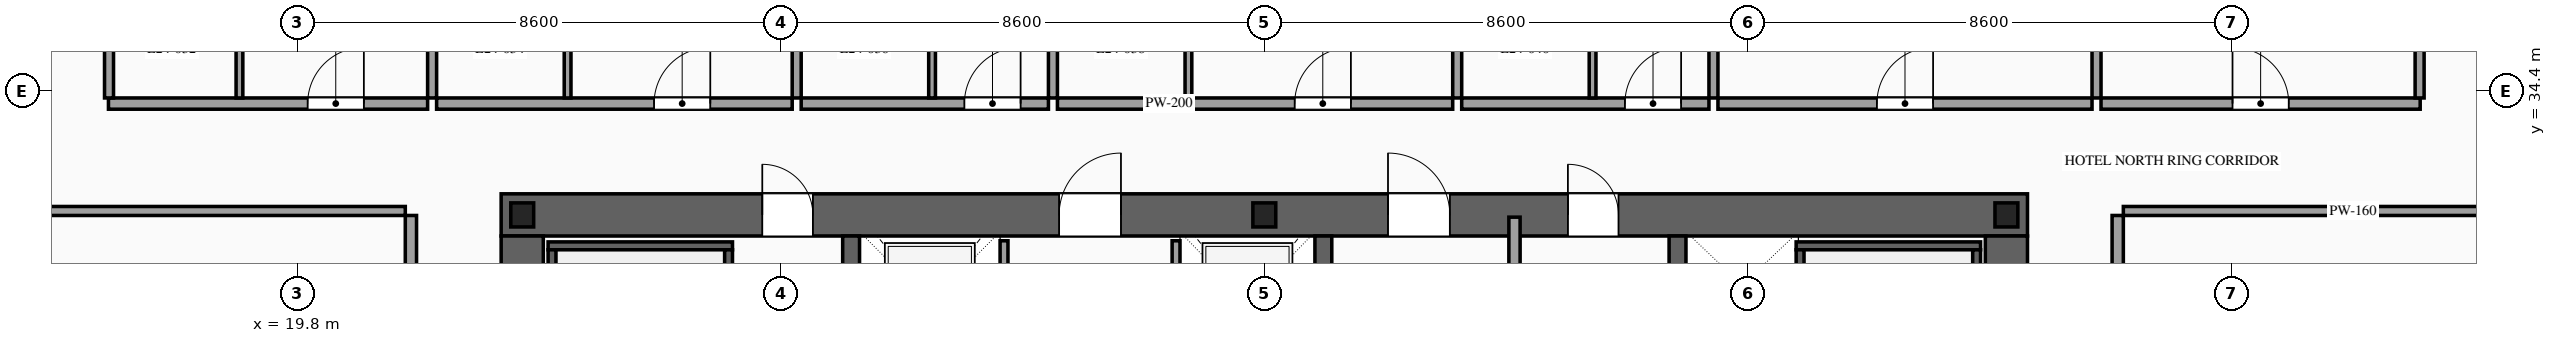
"""IFC4 building model, lengths in metres.
Left out: names, types, materials, properties, quantities, classifications, styles, units other than length and angle.
Written with IfcOpenShell. Run it as: python <this file> out.ifc"""

import sys

from ifc_helpers import new_model, si_unit, direction, frame, frame_2d, origin, origin_2d, place, context, subcontext, project, spatial, rectangle, i_section, extrude, source, transform, mapped, element, fill, save


model = new_model("IFC4")
c1 = context("Model", 3, precision=1e-05, world=origin(), true_north=direction((0.0, 1.0)))
c2 = subcontext(c1, "Body", "Model", "MODEL_VIEW")
j1 = project(units=[si_unit("LENGTHUNIT", "METRE"), si_unit("PLANEANGLEUNIT", "RADIAN")], contexts=[c1])
p1 = place(None, origin())
s1 = spatial("IfcSite", under=j1, at=p1, CompositionType="ELEMENT")
p2 = place(p1, origin())
s2 = spatial("IfcBuilding", under=s1, at=p2, CompositionType="ELEMENT")
p3 = place(p2, frame((0.0, 0.0, 93.8)))
s3 = spatial("IfcBuildingStorey", under=s2, at=p3, CompositionType="ELEMENT", Elevation=93.8)
p4 = place(p3, frame((23.425, 32.2, 0.0), z_axis=(0.0, 0.0, 1.0), x_axis=(1.0, 0.0, 0.0)))
e1 = element("IfcWall", 1, at=p4, inside=s3, PredefinedType="SHEAR", context=c2, shape_type="SweptSolid", body=[
    extrude(rectangle(XDim=27.15, YDim=0.75, at=frame_2d((13.575, 0.0))), origin(), (0.0, 0.0, 1.0), 3.6),
])
p5 = place(p4, frame((4.645, 0.0, 0.0)))
e2 = element("IfcOpeningElement", 2, at=p5, cuts=e1, PredefinedType="OPENING", context=c2, shape_type="SweptSolid", body=[
    extrude(rectangle(XDim=0.9, YDim=2.15, at=frame_2d((0.45, 1.075))), frame((0.0, 0.39, 0.0), z_axis=(0.0, -1.0, 0.0), x_axis=(1.0, 0.0, 0.0)), (0.0, 0.0, 1.0), 0.78),
])
p6 = place(p4, frame((9.925, 0.0, 0.0)))
e3 = element("IfcOpeningElement", 3, at=p6, cuts=e1, PredefinedType="OPENING", context=c2, shape_type="SweptSolid", body=[
    extrude(rectangle(XDim=1.1, YDim=2.2, at=frame_2d((0.55, 1.1))), frame((0.0, 0.39, 0.0), z_axis=(0.0, -1.0, 0.0), x_axis=(1.0, 0.0, 0.0)), (0.0, 0.0, 1.0), 0.78),
])
p7 = place(p4, frame((15.775, 0.0, 0.0)))
e4 = element("IfcOpeningElement", 4, at=p7, cuts=e1, PredefinedType="OPENING", context=c2, shape_type="SweptSolid", body=[
    extrude(rectangle(XDim=1.1, YDim=2.2, at=frame_2d((0.55, 1.1))), frame((0.0, 0.39, 0.0), z_axis=(0.0, -1.0, 0.0), x_axis=(1.0, 0.0, 0.0)), (0.0, 0.0, 1.0), 0.78),
])
p8 = place(p4, frame((18.975, 0.0, 0.0)))
e5 = element("IfcOpeningElement", 5, at=p8, cuts=e1, PredefinedType="OPENING", context=c2, shape_type="SweptSolid", body=[
    extrude(rectangle(XDim=0.9, YDim=2.15, at=frame_2d((0.45, 1.075))), frame((0.0, 0.39, 0.0), z_axis=(0.0, -1.0, 0.0), x_axis=(1.0, 0.0, 0.0)), (0.0, 0.0, 1.0), 0.78),
])
m1 = source(origin(), c2, "Body", "SweptSolid", [
    extrude(rectangle(XDim=12.05, YDim=0.75, at=frame_2d((6.025, 0.0))), origin(), (0.0, 0.0, 1.0), 3.6),
])
for number, where, z_axis, x_axis in (
    (6, (23.8, 19.775, 0.0), (0.0, 0.0, 1.0), (0.0, 1.0, 0.0)),
    (7, (50.2, 19.775, 0.0), (0.0, 0.0, 1.0), (0.0, 1.0, 0.0)),
):
    element("IfcWall", number, at=place(p3, frame(where, z_axis=z_axis, x_axis=x_axis)), inside=s3, PredefinedType="SHEAR", context=c2, shape_type="MappedRepresentation", body=[
        mapped(m1, transform((0.0, 0.0, 0.0), scale=1.0)),
    ])
m2 = source(origin(), c2, "Body", "SweptSolid", [
    extrude(rectangle(XDim=12.05, YDim=0.3, at=frame_2d((6.025, 0.0))), origin(), (0.0, 0.0, 1.0), 3.6),
])
for number, where, z_axis, x_axis in (
    (8, (29.65, 19.775, 0.0), (0.0, 0.0, 1.0), (0.0, 1.0, 0.0)),
    (9, (38.05, 19.775, 0.0), (0.0, 0.0, 1.0), (0.0, 1.0, 0.0)),
    (10, (44.35, 19.775, 0.0), (0.0, 0.0, 1.0), (0.0, 1.0, 0.0)),
):
    element("IfcWall", number, at=place(p3, frame(where, z_axis=z_axis, x_axis=x_axis)), inside=s3, PredefinedType="SOLIDWALL", context=c2, shape_type="MappedRepresentation", body=[
        mapped(m2, transform((0.0, 0.0, 0.0), scale=1.0)),
    ])
m3 = source(origin(), c2, "Body", "SweptSolid", [
    extrude(i_section(OverallWidth=0.407, OverallDepth=0.428, WebThickness=0.02, FlangeThickness=0.035, at=origin_2d()), origin(), (0.0, 0.0, 1.0), 3.6),
])
for number, where, z_axis, x_axis in (
    (11, (23.8, 32.2, 0.0), (0.0, 0.0, 1.0), (1.0, 0.0, 0.0)),
    (12, (37.0, 32.2, 0.0), (0.0, 0.0, 1.0), (1.0, 0.0, 0.0)),
    (13, (50.2, 32.2, 0.0), (0.0, 0.0, 1.0), (1.0, 0.0, 0.0)),
):
    element("IfcColumn", number, at=place(p3, frame(where, z_axis=z_axis, x_axis=x_axis)), inside=s3, PredefinedType="COLUMN", context=c2, shape_type="MappedRepresentation", body=[
        mapped(m3, transform((0.0, 0.0, 0.0), scale=1.0)),
    ])
p9 = place(p3, frame((32.37, 29.4, 0.0), z_axis=(0.0, 0.0, 1.0), x_axis=(0.0, 1.0, 0.0)))
e14 = element("IfcWall", 14, at=p9, inside=s3, PredefinedType="SOLIDWALL", context=c2, shape_type="SweptSolid", body=[
    extrude(rectangle(XDim=2.34, YDim=0.14, at=frame_2d((1.17, 0.0))), origin(), (0.0, 0.0, 1.0), 3.38),
])
p10 = place(p9, frame((0.62, 0.0, 0.0)))
e15 = element("IfcOpeningElement", 15, at=p10, cuts=e14, PredefinedType="OPENING", context=c2, shape_type="SweptSolid", body=[
    extrude(rectangle(XDim=1.1, YDim=2.2, at=frame_2d((0.55, 1.1))), frame((0.0, 0.085, 0.0), z_axis=(0.0, -1.0, 0.0), x_axis=(1.0, 0.0, 0.0)), (0.0, 0.0, 1.0), 0.17),
])
p11 = place(p3, frame((35.43, 29.4, 0.0), z_axis=(0.0, 0.0, 1.0), x_axis=(0.0, 1.0, 0.0)))
e16 = element("IfcWall", 16, at=p11, inside=s3, PredefinedType="SOLIDWALL", context=c2, shape_type="SweptSolid", body=[
    extrude(rectangle(XDim=2.34, YDim=0.14, at=frame_2d((1.17, 0.0))), origin(), (0.0, 0.0, 1.0), 3.38),
])
p12 = place(p11, frame((0.62, 0.0, 0.0)))
e17 = element("IfcOpeningElement", 17, at=p12, cuts=e16, PredefinedType="OPENING", context=c2, shape_type="SweptSolid", body=[
    extrude(rectangle(XDim=1.1, YDim=2.2, at=frame_2d((0.55, 1.1))), frame((0.0, 0.085, 0.0), z_axis=(0.0, -1.0, 0.0), x_axis=(1.0, 0.0, 0.0)), (0.0, 0.0, 1.0), 0.17),
])
m4 = source(origin(), c2, "Body", "SweptSolid", [
    extrude(rectangle(XDim=3.28, YDim=0.14, at=frame_2d((1.64, 0.0))), origin(), (0.0, 0.0, 1.0), 3.38),
])
p13 = place(p3, frame((24.26, 31.65, 0.0), z_axis=(0.0, 0.0, 1.0), x_axis=(1.0, 0.0, 0.0)))
e18 = element("IfcWall", 18, at=p13, inside=s3, PredefinedType="SOLIDWALL", context=c2, shape_type="MappedRepresentation", body=[
    mapped(m4, transform((0.0, 0.0, 0.0), scale=1.0)),
])
m5 = source(origin(), c2, "Body", "SweptSolid", [
    extrude(rectangle(XDim=8.94, YDim=0.14, at=frame_2d((4.47, 0.0))), origin(), (0.0, 0.0, 1.0), 3.38),
])
for number, where, z_axis, x_axis in (
    (19, (24.33, 22.64, 0.0), (0.0, 0.0, 1.0), (0.0, 1.0, 0.0)),
    (20, (27.47, 22.64, 0.0), (0.0, 0.0, 1.0), (0.0, 1.0, 0.0)),
):
    element("IfcWall", number, at=place(p3, frame(where, z_axis=z_axis, x_axis=x_axis)), inside=s3, PredefinedType="SOLIDWALL", context=c2, shape_type="MappedRepresentation", body=[
        mapped(m5, transform((0.0, 0.0, 0.0), scale=1.0)),
    ])
p14 = place(p3, frame((46.46, 31.65, 0.0), z_axis=(0.0, 0.0, 1.0), x_axis=(1.0, 0.0, 0.0)))
e21 = element("IfcWall", 21, at=p14, inside=s3, PredefinedType="SOLIDWALL", context=c2, shape_type="MappedRepresentation", body=[
    mapped(m4, transform((0.0, 0.0, 0.0), scale=1.0)),
])
for number, where, z_axis, x_axis in (
    (22, (46.53, 22.64, 0.0), (0.0, 0.0, 1.0), (0.0, 1.0, 0.0)),
    (23, (49.67, 22.64, 0.0), (0.0, 0.0, 1.0), (0.0, 1.0, 0.0)),
):
    element("IfcWall", number, at=place(p3, frame(where, z_axis=z_axis, x_axis=x_axis)), inside=s3, PredefinedType="SOLIDWALL", context=c2, shape_type="MappedRepresentation", body=[
        mapped(m5, transform((0.0, 0.0, 0.0), scale=1.0)),
    ])
m6 = source(origin(), c2, "Body", "SweptSolid", [
    extrude(rectangle(XDim=5.96, YDim=0.2, at=frame_2d((2.98, 0.0))), origin(), (0.0, 0.0, 1.0), 3.38),
])
p15 = place(p3, frame((41.45, 26.2, 0.0), z_axis=(0.0, 0.0, 1.0), x_axis=(0.0, 1.0, 0.0)))
e24 = element("IfcWall", 24, at=p15, inside=s3, PredefinedType="PARTITIONING", context=c2, shape_type="MappedRepresentation", body=[
    mapped(m6, transform((0.0, 0.0, 0.0), scale=1.0)),
])
p16 = place(p3, frame((16.44, 34.18, 0.0), z_axis=(0.0, 0.0, 1.0), x_axis=(1.0, 0.0, 0.0)))
e25 = element("IfcWall", 25, at=p16, inside=s3, PredefinedType="PARTITIONING", context=c2, shape_type="SweptSolid", body=[
    extrude(rectangle(XDim=5.677, YDim=0.2, at=frame_2d((2.838, 0.0))), origin(), (0.0, 0.0, 1.0), 3.38),
])
p17 = place(p16, frame((3.543, 0.0, 0.0)))
e26 = element("IfcOpeningElement", 26, at=p17, cuts=e25, PredefinedType="OPENING", context=c2, shape_type="SweptSolid", body=[
    extrude(rectangle(XDim=1.0, YDim=2.2, at=frame_2d((0.5, 1.1))), frame((0.0, 0.115, 0.0), z_axis=(0.0, -1.0, 0.0), x_axis=(1.0, 0.0, 0.0)), (0.0, 0.0, 1.0), 0.23),
])
m7 = source(origin(), c2, "Body", "SweptSolid", [
    extrude(rectangle(XDim=14.97, YDim=0.16, at=frame_2d((7.485, 0.0))), origin(), (0.0, 0.0, 1.0), 3.38),
])
p18 = place(p3, frame((22.197, 34.28, 0.0), z_axis=(0.0, 0.0, 1.0), x_axis=(0.0, 1.0, 0.0)))
e27 = element("IfcWall", 27, at=p18, inside=s3, PredefinedType="PARTITIONING", context=c2, shape_type="MappedRepresentation", body=[
    mapped(m7, transform((0.0, 0.0, 0.0), scale=1.0)),
])
m8 = source(origin(), c2, "Body", "SweptSolid", [
    extrude(rectangle(XDim=2.42, YDim=0.12, at=frame_2d((1.21, 0.0))), origin(), (0.0, 0.0, 1.0), 3.38),
])
p19 = place(p3, frame((18.77, 34.28, 0.0), z_axis=(0.0, 0.0, 1.0), x_axis=(0.0, 1.0, 0.0)))
e28 = element("IfcWall", 28, at=p19, inside=s3, PredefinedType="PARTITIONING", context=c2, shape_type="MappedRepresentation", body=[
    mapped(m8, transform((0.0, 0.0, 0.0), scale=1.0)),
])
p20 = place(p3, frame((22.277, 34.18, 0.0), z_axis=(0.0, 0.0, 1.0), x_axis=(1.0, 0.0, 0.0)))
e29 = element("IfcWall", 29, at=p20, inside=s3, PredefinedType="PARTITIONING", context=c2, shape_type="SweptSolid", body=[
    extrude(rectangle(XDim=6.325, YDim=0.2, at=frame_2d((3.163, 0.0))), origin(), (0.0, 0.0, 1.0), 3.38),
])
p21 = place(p20, frame((3.868, 0.0, 0.0)))
e30 = element("IfcOpeningElement", 30, at=p21, cuts=e29, PredefinedType="OPENING", context=c2, shape_type="SweptSolid", body=[
    extrude(rectangle(XDim=1.0, YDim=2.2, at=frame_2d((0.5, 1.1))), frame((0.0, 0.115, 0.0), z_axis=(0.0, -1.0, 0.0), x_axis=(1.0, 0.0, 0.0)), (0.0, 0.0, 1.0), 0.23),
])
p22 = place(p3, frame((28.682, 34.28, 0.0), z_axis=(0.0, 0.0, 1.0), x_axis=(0.0, 1.0, 0.0)))
e31 = element("IfcWall", 31, at=p22, inside=s3, PredefinedType="PARTITIONING", context=c2, shape_type="MappedRepresentation", body=[
    mapped(m7, transform((0.0, 0.0, 0.0), scale=1.0)),
])
p23 = place(p3, frame((24.607, 34.28, 0.0), z_axis=(0.0, 0.0, 1.0), x_axis=(0.0, 1.0, 0.0)))
e32 = element("IfcWall", 32, at=p23, inside=s3, PredefinedType="PARTITIONING", context=c2, shape_type="MappedRepresentation", body=[
    mapped(m8, transform((0.0, 0.0, 0.0), scale=1.0)),
])
p24 = place(p3, frame((28.762, 34.18, 0.0), z_axis=(0.0, 0.0, 1.0), x_axis=(1.0, 0.0, 0.0)))
e33 = element("IfcWall", 33, at=p24, inside=s3, PredefinedType="PARTITIONING", context=c2, shape_type="SweptSolid", body=[
    extrude(rectangle(XDim=4.398, YDim=0.2, at=frame_2d((2.199, 0.0))), origin(), (0.0, 0.0, 1.0), 3.38),
])
p25 = place(p24, frame((2.903, 0.0, 0.0)))
e34 = element("IfcOpeningElement", 34, at=p25, cuts=e33, PredefinedType="OPENING", context=c2, shape_type="SweptSolid", body=[
    extrude(rectangle(XDim=1.0, YDim=2.2, at=frame_2d((0.5, 1.1))), frame((0.0, 0.115, 0.0), z_axis=(0.0, -1.0, 0.0), x_axis=(1.0, 0.0, 0.0)), (0.0, 0.0, 1.0), 0.23),
])
p26 = place(p3, frame((33.24, 34.28, 0.0), z_axis=(0.0, 0.0, 1.0), x_axis=(0.0, 1.0, 0.0)))
e35 = element("IfcWall", 35, at=p26, inside=s3, PredefinedType="PARTITIONING", context=c2, shape_type="MappedRepresentation", body=[
    mapped(m7, transform((0.0, 0.0, 0.0), scale=1.0)),
])
p27 = place(p3, frame((31.09, 34.28, 0.0), z_axis=(0.0, 0.0, 1.0), x_axis=(0.0, 1.0, 0.0)))
e36 = element("IfcWall", 36, at=p27, inside=s3, PredefinedType="PARTITIONING", context=c2, shape_type="MappedRepresentation", body=[
    mapped(m8, transform((0.0, 0.0, 0.0), scale=1.0)),
])
p28 = place(p3, frame((33.32, 34.18, 0.0), z_axis=(0.0, 0.0, 1.0), x_axis=(1.0, 0.0, 0.0)))
e37 = element("IfcWall", 37, at=p28, inside=s3, PredefinedType="PARTITIONING", context=c2, shape_type="SweptSolid", body=[
    extrude(rectangle(XDim=7.031, YDim=0.2, at=frame_2d((3.516, 0.0))), origin(), (0.0, 0.0, 1.0), 3.38),
])
p29 = place(p28, frame((4.22, 0.0, 0.0)))
e38 = element("IfcOpeningElement", 38, at=p29, cuts=e37, PredefinedType="OPENING", context=c2, shape_type="SweptSolid", body=[
    extrude(rectangle(XDim=1.0, YDim=2.2, at=frame_2d((0.5, 1.1))), frame((0.0, 0.115, 0.0), z_axis=(0.0, -1.0, 0.0), x_axis=(1.0, 0.0, 0.0)), (0.0, 0.0, 1.0), 0.23),
])
p30 = place(p3, frame((40.431, 34.28, 0.0), z_axis=(0.0, 0.0, 1.0), x_axis=(0.0, 1.0, 0.0)))
e39 = element("IfcWall", 39, at=p30, inside=s3, PredefinedType="PARTITIONING", context=c2, shape_type="MappedRepresentation", body=[
    mapped(m7, transform((0.0, 0.0, 0.0), scale=1.0)),
])
p31 = place(p3, frame((35.65, 34.28, 0.0), z_axis=(0.0, 0.0, 1.0), x_axis=(0.0, 1.0, 0.0)))
e40 = element("IfcWall", 40, at=p31, inside=s3, PredefinedType="PARTITIONING", context=c2, shape_type="MappedRepresentation", body=[
    mapped(m8, transform((0.0, 0.0, 0.0), scale=1.0)),
])
p32 = place(p3, frame((40.511, 34.18, 0.0), z_axis=(0.0, 0.0, 1.0), x_axis=(1.0, 0.0, 0.0)))
e41 = element("IfcWall", 41, at=p32, inside=s3, PredefinedType="PARTITIONING", context=c2, shape_type="SweptSolid", body=[
    extrude(rectangle(XDim=4.398, YDim=0.2, at=frame_2d((2.199, 0.0))), origin(), (0.0, 0.0, 1.0), 3.38),
])
p33 = place(p32, frame((2.903, 0.0, 0.0)))
e42 = element("IfcOpeningElement", 42, at=p33, cuts=e41, PredefinedType="OPENING", context=c2, shape_type="SweptSolid", body=[
    extrude(rectangle(XDim=1.0, YDim=2.2, at=frame_2d((0.5, 1.1))), frame((0.0, 0.115, 0.0), z_axis=(0.0, -1.0, 0.0), x_axis=(1.0, 0.0, 0.0)), (0.0, 0.0, 1.0), 0.23),
])
p34 = place(p3, frame((44.989, 34.28, 0.0), z_axis=(0.0, 0.0, 1.0), x_axis=(0.0, 1.0, 0.0)))
e43 = element("IfcWall", 43, at=p34, inside=s3, PredefinedType="PARTITIONING", context=c2, shape_type="MappedRepresentation", body=[
    mapped(m7, transform((0.0, 0.0, 0.0), scale=1.0)),
])
p35 = place(p3, frame((42.839, 34.28, 0.0), z_axis=(0.0, 0.0, 1.0), x_axis=(0.0, 1.0, 0.0)))
e44 = element("IfcWall", 44, at=p35, inside=s3, PredefinedType="PARTITIONING", context=c2, shape_type="MappedRepresentation", body=[
    mapped(m8, transform((0.0, 0.0, 0.0), scale=1.0)),
])
p36 = place(p3, frame((45.069, 34.18, 0.0), z_axis=(0.0, 0.0, 1.0), x_axis=(1.0, 0.0, 0.0)))
e45 = element("IfcWall", 45, at=p36, inside=s3, PredefinedType="PARTITIONING", context=c2, shape_type="SweptSolid", body=[
    extrude(rectangle(XDim=6.654, YDim=0.2, at=frame_2d((3.327, 0.0))), origin(), (0.0, 0.0, 1.0), 3.38),
])
p37 = place(p36, frame((2.827, 0.0, 0.0)))
e46 = element("IfcOpeningElement", 46, at=p37, cuts=e45, PredefinedType="OPENING", context=c2, shape_type="SweptSolid", body=[
    extrude(rectangle(XDim=1.0, YDim=2.2, at=frame_2d((0.5, 1.1))), frame((0.0, 0.115, 0.0), z_axis=(0.0, -1.0, 0.0), x_axis=(1.0, 0.0, 0.0)), (0.0, 0.0, 1.0), 0.23),
])
p38 = place(p3, frame((51.803, 34.28, 0.0), z_axis=(0.0, 0.0, 1.0), x_axis=(0.0, 1.0, 0.0)))
e47 = element("IfcWall", 47, at=p38, inside=s3, PredefinedType="PARTITIONING", context=c2, shape_type="MappedRepresentation", body=[
    mapped(m7, transform((0.0, 0.0, 0.0), scale=1.0)),
])
p39 = place(p3, frame((51.883, 34.18, 0.0), z_axis=(0.0, 0.0, 1.0), x_axis=(1.0, 0.0, 0.0)))
e48 = element("IfcWall", 48, at=p39, inside=s3, PredefinedType="PARTITIONING", context=c2, shape_type="SweptSolid", body=[
    extrude(rectangle(XDim=5.677, YDim=0.2, at=frame_2d((2.838, 0.0))), origin(), (0.0, 0.0, 1.0), 3.38),
])
p40 = place(p39, frame((2.339, 0.0, 0.0)))
e49 = element("IfcOpeningElement", 49, at=p40, cuts=e48, PredefinedType="OPENING", context=c2, shape_type="SweptSolid", body=[
    extrude(rectangle(XDim=1.0, YDim=2.2, at=frame_2d((0.5, 1.1))), frame((0.0, 0.115, 0.0), z_axis=(0.0, -1.0, 0.0), x_axis=(1.0, 0.0, 0.0)), (0.0, 0.0, 1.0), 0.23),
])
m9 = source(origin(), c2, "Body", "SweptSolid", [
    extrude(rectangle(XDim=14.82, YDim=0.16, at=frame_2d((7.41, 0.0))), origin(), (0.0, 0.0, 1.0), 3.38),
])
for number, where, z_axis, x_axis in (
    (50, (16.45, 34.28, 0.0), (0.0, 0.0, 1.0), (0.0, 1.0, 0.0)),
    (51, (57.55, 34.28, 0.0), (0.0, 0.0, 1.0), (0.0, 1.0, 0.0)),
):
    element("IfcWall", number, at=place(p3, frame(where, z_axis=z_axis, x_axis=x_axis)), inside=s3, PredefinedType="PARTITIONING", context=c2, shape_type="MappedRepresentation", body=[
        mapped(m9, transform((0.0, 0.0, 0.0), scale=1.0)),
    ])
p41 = place(p3, frame((21.82, 25.88, 0.0), z_axis=(0.0, 0.0, 1.0), x_axis=(0.0, 1.0, 0.0)))
e52 = element("IfcWall", 52, at=p41, inside=s3, PredefinedType="PARTITIONING", context=c2, shape_type="SweptSolid", body=[
    extrude(rectangle(XDim=6.31, YDim=0.2, at=frame_2d((3.155, 0.0))), origin(), (0.0, 0.0, 1.0), 3.38),
])
p42 = place(p41, frame((3.835, 0.0, 0.0)))
e53 = element("IfcOpeningElement", 53, at=p42, cuts=e52, PredefinedType="OPENING", context=c2, shape_type="SweptSolid", body=[
    extrude(rectangle(XDim=1.0, YDim=2.2, at=frame_2d((0.5, 1.1))), frame((0.0, 0.115, 0.0), z_axis=(0.0, -1.0, 0.0), x_axis=(1.0, 0.0, 0.0)), (0.0, 0.0, 1.0), 0.23),
])
m10 = source(origin(), c2, "Body", "SweptSolid", [
    extrude(rectangle(XDim=8.17, YDim=0.16, at=frame_2d((4.085, 0.0))), origin(), (0.0, 0.0, 1.0), 2.875),
])
p43 = place(p3, frame((13.55, 32.27, 0.0), z_axis=(0.0, 0.0, 1.0), x_axis=(1.0, 0.0, 0.0)))
e54 = element("IfcWall", 54, at=p43, inside=s3, PredefinedType="PARTITIONING", context=c2, shape_type="MappedRepresentation", body=[
    mapped(m10, transform((0.0, 0.0, 0.0), scale=1.0)),
])
p44 = place(p3, frame((52.18, 25.88, 0.0), z_axis=(0.0, 0.0, 1.0), x_axis=(0.0, 1.0, 0.0)))
e55 = element("IfcWall", 55, at=p44, inside=s3, PredefinedType="PARTITIONING", context=c2, shape_type="SweptSolid", body=[
    extrude(rectangle(XDim=6.31, YDim=0.2, at=frame_2d((3.155, 0.0))), origin(), (0.0, 0.0, 1.0), 3.38),
])
p45 = place(p44, frame((3.835, 0.0, 0.0)))
e56 = element("IfcOpeningElement", 56, at=p45, cuts=e55, PredefinedType="OPENING", context=c2, shape_type="SweptSolid", body=[
    extrude(rectangle(XDim=1.0, YDim=2.2, at=frame_2d((0.5, 1.1))), frame((0.0, 0.115, 0.0), z_axis=(0.0, -1.0, 0.0), x_axis=(1.0, 0.0, 0.0)), (0.0, 0.0, 1.0), 0.23),
])
p46 = place(p3, frame((52.28, 32.27, 0.0), z_axis=(0.0, 0.0, 1.0), x_axis=(1.0, 0.0, 0.0)))
e57 = element("IfcWall", 57, at=p46, inside=s3, PredefinedType="PARTITIONING", context=c2, shape_type="MappedRepresentation", body=[
    mapped(m10, transform((0.0, 0.0, 0.0), scale=1.0)),
])
m11 = source(origin(), c2, "Body", "SweptSolid", [
    extrude(rectangle(XDim=0.9, YDim=2.15, at=frame_2d((0.45, 1.075))), frame((0.0, 0.025, 0.0), z_axis=(0.0, -1.0, 0.0), x_axis=(1.0, 0.0, 0.0)), (0.0, 0.0, 1.0), 0.05),
])
p47 = place(p5, origin())
e58 = element("IfcDoor", 58, at=p47, inside=s3, OperationType="SINGLE_SWING_LEFT", PredefinedType="DOOR", context=c2, shape_type="MappedRepresentation", body=[
    mapped(m11, transform((0.0, 0.0, 0.0), scale=1.0)),
])
fill(e2, e58)
m12 = source(origin(), c2, "Body", "SweptSolid", [
    extrude(rectangle(XDim=1.1, YDim=2.2, at=frame_2d((0.55, 1.1))), frame((0.0, 0.025, 0.0), z_axis=(0.0, -1.0, 0.0), x_axis=(1.0, 0.0, 0.0)), (0.0, 0.0, 1.0), 0.05),
])
p48 = place(p6, origin())
e59 = element("IfcDoor", 59, at=p48, inside=s3, OperationType="SINGLE_SWING_RIGHT", PredefinedType="DOOR", context=c2, shape_type="MappedRepresentation", body=[
    mapped(m12, transform((0.0, 0.0, 0.0), scale=1.0)),
])
fill(e3, e59)
p49 = place(p7, origin())
e60 = element("IfcDoor", 60, at=p49, inside=s3, OperationType="SINGLE_SWING_LEFT", PredefinedType="DOOR", context=c2, shape_type="MappedRepresentation", body=[
    mapped(m12, transform((0.0, 0.0, 0.0), scale=1.0)),
])
fill(e4, e60)
p50 = place(p8, origin())
e61 = element("IfcDoor", 61, at=p50, inside=s3, OperationType="SINGLE_SWING_LEFT", PredefinedType="DOOR", context=c2, shape_type="MappedRepresentation", body=[
    mapped(m11, transform((0.0, 0.0, 0.0), scale=1.0)),
])
fill(e5, e61)
m13 = source(origin(), c2, "Body", "SweptSolid", [
    extrude(rectangle(XDim=1.0, YDim=2.2, at=frame_2d((0.5, 1.1))), frame((0.0, 0.025, 0.0), z_axis=(0.0, -1.0, 0.0), x_axis=(1.0, 0.0, 0.0)), (0.0, 0.0, 1.0), 0.05),
])
p51 = place(p17, origin())
e62 = element("IfcDoor", 62, at=p51, inside=s3, OperationType="SINGLE_SWING_RIGHT", PredefinedType="DOOR", context=c2, shape_type="MappedRepresentation", body=[
    mapped(m13, transform((0.0, 0.0, 0.0), scale=1.0)),
])
fill(e26, e62)
p52 = place(p21, origin())
e63 = element("IfcDoor", 63, at=p52, inside=s3, OperationType="SINGLE_SWING_RIGHT", PredefinedType="DOOR", context=c2, shape_type="MappedRepresentation", body=[
    mapped(m13, transform((0.0, 0.0, 0.0), scale=1.0)),
])
fill(e30, e63)
p53 = place(p25, origin())
e64 = element("IfcDoor", 64, at=p53, inside=s3, OperationType="SINGLE_SWING_RIGHT", PredefinedType="DOOR", context=c2, shape_type="MappedRepresentation", body=[
    mapped(m13, transform((0.0, 0.0, 0.0), scale=1.0)),
])
fill(e34, e64)
p54 = place(p29, origin())
e65 = element("IfcDoor", 65, at=p54, inside=s3, OperationType="SINGLE_SWING_RIGHT", PredefinedType="DOOR", context=c2, shape_type="MappedRepresentation", body=[
    mapped(m13, transform((0.0, 0.0, 0.0), scale=1.0)),
])
fill(e38, e65)
p55 = place(p33, origin())
e66 = element("IfcDoor", 66, at=p55, inside=s3, OperationType="SINGLE_SWING_RIGHT", PredefinedType="DOOR", context=c2, shape_type="MappedRepresentation", body=[
    mapped(m13, transform((0.0, 0.0, 0.0), scale=1.0)),
])
fill(e42, e66)
p56 = place(p37, origin())
e67 = element("IfcDoor", 67, at=p56, inside=s3, OperationType="SINGLE_SWING_RIGHT", PredefinedType="DOOR", context=c2, shape_type="MappedRepresentation", body=[
    mapped(m13, transform((0.0, 0.0, 0.0), scale=1.0)),
])
fill(e46, e67)
p57 = place(p40, origin())
e68 = element("IfcDoor", 68, at=p57, inside=s3, OperationType="SINGLE_SWING_LEFT", PredefinedType="DOOR", context=c2, shape_type="MappedRepresentation", body=[
    mapped(m13, transform((0.0, 0.0, 0.0), scale=1.0)),
])
fill(e49, e68)
save(model, sys.argv[1])
